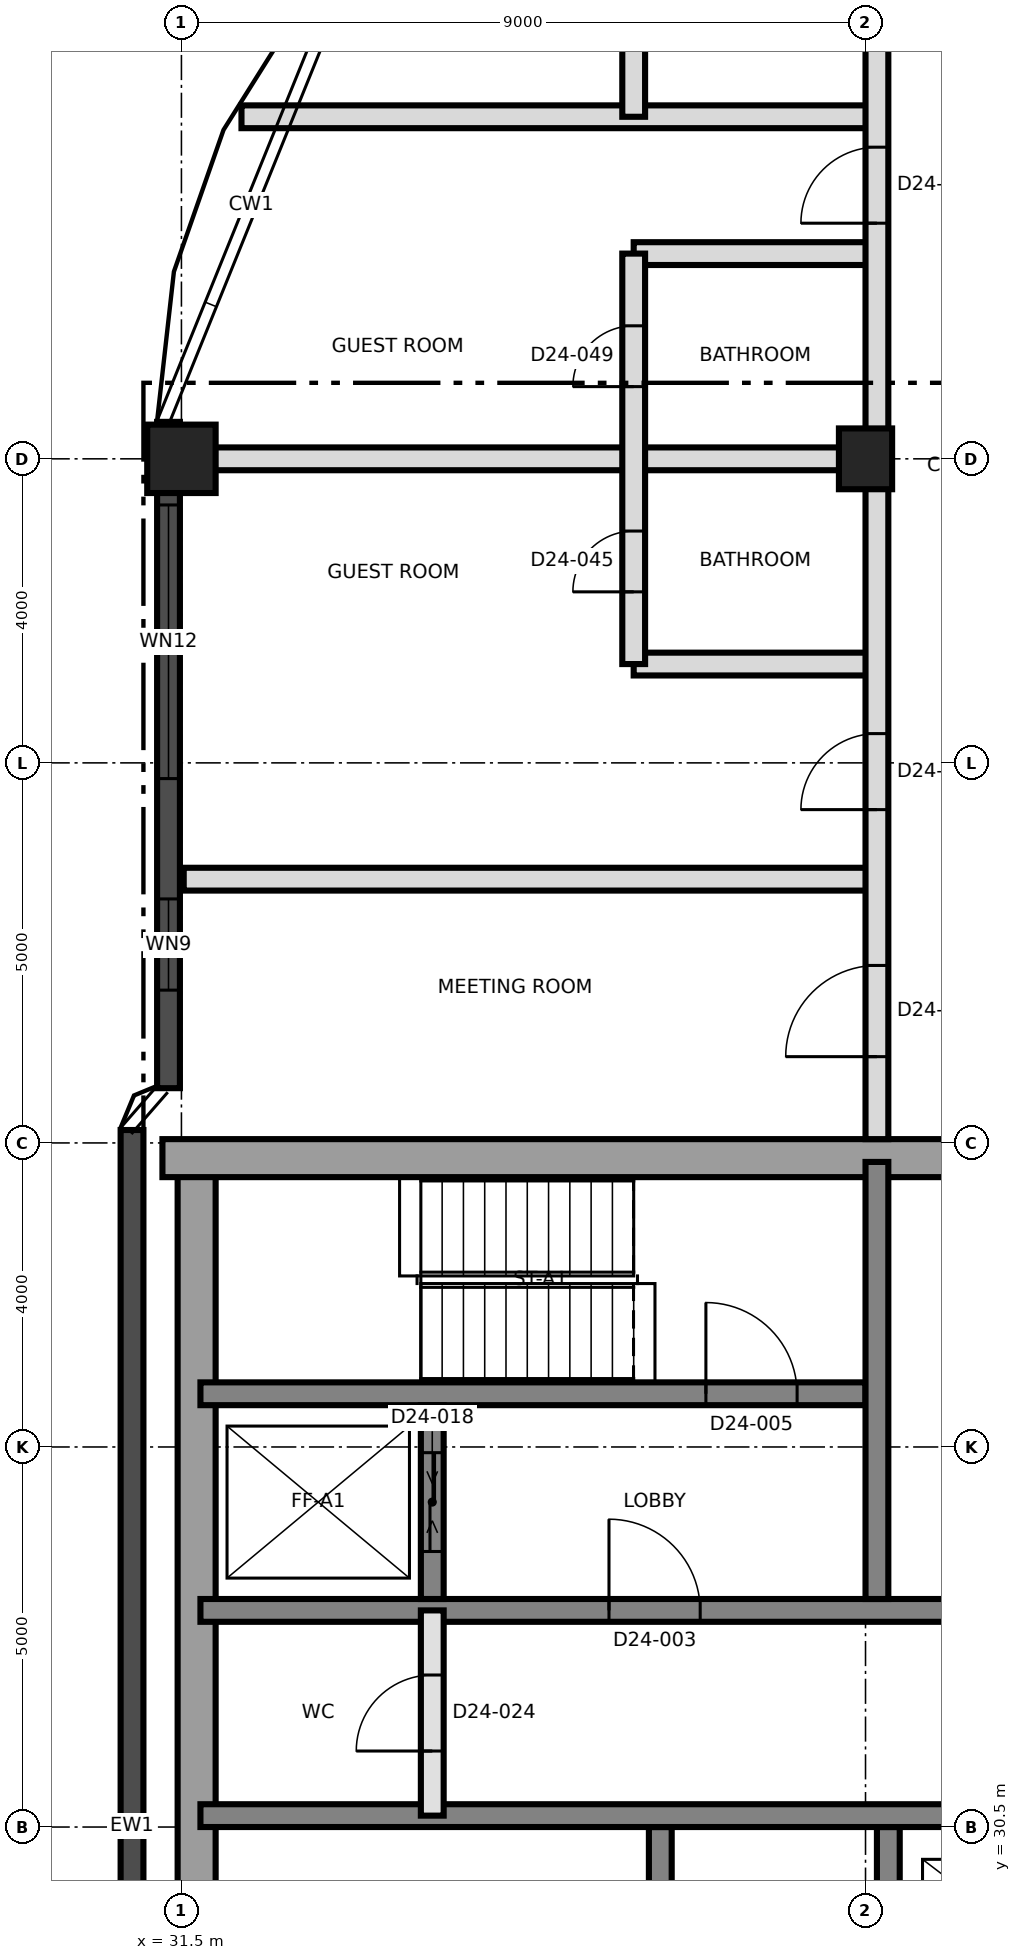
"""IFC4 building model, lengths in metres.
Left out: names, types, materials, properties, quantities, classifications, styles, units other than length and angle.
Written with IfcOpenShell. Run it as: python <this file> out.ifc"""

import sys

from ifc_helpers import new_model, si_unit, direction, frame, frame_2d, origin, origin_2d, place, context, subcontext, project, spatial, rectangle, extrude, element, fill, save


model = new_model("IFC4")
c1 = context("Model", 3, precision=1e-05, world=origin(), true_north=direction((0.0, 1.0)))
c2 = subcontext(c1, "Body", "Model", "MODEL_VIEW")
j1 = project(units=[si_unit("LENGTHUNIT", "METRE"), si_unit("PLANEANGLEUNIT", "RADIAN")], contexts=[c1])
p1 = place(None, origin())
s1 = spatial("IfcSite", under=j1, at=p1, CompositionType="ELEMENT")
p2 = place(p1, origin())
s2 = spatial("IfcBuilding", under=s1, at=p2, CompositionType="ELEMENT")
p3 = place(p2, frame((0.0, 0.0, 218.0)))
s3 = spatial("IfcBuildingStorey", under=s2, at=p3, CompositionType="ELEMENT", Elevation=218.0)
p4 = place(p3, frame((31.7, 21.75, 0.0), z_axis=(0.0, 0.0, 1.0), x_axis=(0.0, 1.0, 0.0)))
e1 = element("IfcWall", 1, at=p4, inside=s3, PredefinedType="SHEAR", context=c2, shape_type="SweptSolid", body=[
    extrude(rectangle(XDim=17.5, YDim=0.5, at=frame_2d((8.75, 0.0))), origin(), (0.0, 0.0, 1.0), 3.7),
])
p5 = place(p3, frame((31.25, 39.3, 0.0), z_axis=(0.0, 0.0, 1.0), x_axis=(1.0, 0.0, 0.0)))
e2 = element("IfcWall", 2, at=p5, inside=s3, PredefinedType="SHEAR", context=c2, shape_type="SweptSolid", body=[
    extrude(rectangle(XDim=27.0, YDim=0.5, at=frame_2d((13.5, 0.0))), origin(), (0.0, 0.0, 1.0), 3.7),
])
p6 = place(p5, frame((10.45, 0.0, 0.0)))
e3 = element("IfcOpeningElement", 3, at=p6, cuts=e2, PredefinedType="OPENING", context=c2, shape_type="SweptSolid", body=[
    extrude(rectangle(XDim=1.2, YDim=2.1, at=frame_2d((0.6, 1.05))), frame((0.0, 0.26, 0.0), z_axis=(0.0, -1.0, 0.0), x_axis=(1.0, 0.0, 0.0)), (0.0, 0.0, 1.0), 0.52),
])
p7 = place(p3, frame((37.8, 21.75, 0.0), z_axis=(0.0, 0.0, 1.0), x_axis=(0.0, 1.0, 0.0)))
e4 = element("IfcWall", 4, at=p7, inside=s3, PredefinedType="SHEAR", context=c2, shape_type="SweptSolid", body=[
    extrude(rectangle(XDim=8.75, YDim=0.3, at=frame_2d((4.375, 0.0))), origin(), (0.0, 0.0, 1.0), 3.7),
])
p8 = place(p7, frame((5.525, 0.0, 0.0)))
e5 = element("IfcOpeningElement", 5, at=p8, cuts=e4, PredefinedType="OPENING", context=c2, shape_type="SweptSolid", body=[
    extrude(rectangle(XDim=1.0, YDim=2.1, at=frame_2d((0.5, 1.05))), frame((0.0, 0.16, 0.0), z_axis=(0.0, -1.0, 0.0), x_axis=(1.0, 0.0, 0.0)), (0.0, 0.0, 1.0), 0.32),
])
p9 = place(p3, frame((40.8, 21.75, 0.0), z_axis=(0.0, 0.0, 1.0), x_axis=(0.0, 1.0, 0.0)))
e6 = element("IfcWall", 6, at=p9, inside=s3, PredefinedType="SHEAR", context=c2, shape_type="SweptSolid", body=[
    extrude(rectangle(XDim=8.75, YDim=0.3, at=frame_2d((4.375, 0.0))), origin(), (0.0, 0.0, 1.0), 3.7),
])
p10 = place(p9, frame((3.9, 0.0, 0.0)))
e7 = element("IfcOpeningElement", 7, at=p10, cuts=e6, PredefinedType="OPENING", context=c2, shape_type="SweptSolid", body=[
    extrude(rectangle(XDim=1.5, YDim=2.1, at=frame_2d((0.75, 1.05))), frame((0.0, 0.16, 0.0), z_axis=(0.0, -1.0, 0.0), x_axis=(1.0, 0.0, 0.0)), (0.0, 0.0, 1.0), 0.32),
])
p11 = place(p3, frame((31.75, 30.65, 0.0), z_axis=(0.0, 0.0, 1.0), x_axis=(1.0, 0.0, 0.0)))
e8 = element("IfcWall", 8, at=p11, inside=s3, PredefinedType="SHEAR", context=c2, shape_type="SweptSolid", body=[
    extrude(rectangle(XDim=26.5, YDim=0.3, at=frame_2d((13.25, 0.0))), origin(), (0.0, 0.0, 1.0), 3.7),
])
p12 = place(p11, frame((24.75, 0.0, 0.0)))
e9 = element("IfcOpeningElement", 9, at=p12, cuts=e8, PredefinedType="OPENING", context=c2, shape_type="SweptSolid", body=[
    extrude(rectangle(XDim=1.0, YDim=2.1, at=frame_2d((0.5, 1.05))), frame((0.0, 0.16, 0.0), z_axis=(0.0, -1.0, 0.0), x_axis=(1.0, 0.0, 0.0)), (0.0, 0.0, 1.0), 0.32),
])
p13 = place(p3, frame((31.75, 33.35, 0.0), z_axis=(0.0, 0.0, 1.0), x_axis=(1.0, 0.0, 0.0)))
e10 = element("IfcWall", 10, at=p13, inside=s3, PredefinedType="SHEAR", context=c2, shape_type="SweptSolid", body=[
    extrude(rectangle(XDim=26.5, YDim=0.3, at=frame_2d((13.25, 0.0))), origin(), (0.0, 0.0, 1.0), 3.7),
])
p14 = place(p13, frame((13.9, 0.0, 0.0)))
e11 = element("IfcOpeningElement", 11, at=p14, cuts=e10, PredefinedType="OPENING", context=c2, shape_type="SweptSolid", body=[
    extrude(rectangle(XDim=1.4, YDim=2.1, at=frame_2d((0.7, 1.05))), frame((0.0, 0.16, 0.0), z_axis=(0.0, -1.0, 0.0), x_axis=(1.0, 0.0, 0.0)), (0.0, 0.0, 1.0), 0.32),
])
p15 = place(p13, frame((5.375, 0.0, 0.0)))
e12 = element("IfcOpeningElement", 12, at=p15, cuts=e10, PredefinedType="OPENING", context=c2, shape_type="SweptSolid", body=[
    extrude(rectangle(XDim=1.2, YDim=2.1, at=frame_2d((0.6, 1.05))), frame((0.0, 0.16, 0.0), z_axis=(0.0, -1.0, 0.0), x_axis=(1.0, 0.0, 0.0)), (0.0, 0.0, 1.0), 0.32),
])
p16 = place(p13, frame((19.925, 0.0, 0.0)))
e13 = element("IfcOpeningElement", 13, at=p16, cuts=e10, PredefinedType="OPENING", context=c2, shape_type="SweptSolid", body=[
    extrude(rectangle(XDim=1.2, YDim=2.1, at=frame_2d((0.6, 1.05))), frame((0.0, 0.16, 0.0), z_axis=(0.0, -1.0, 0.0), x_axis=(1.0, 0.0, 0.0)), (0.0, 0.0, 1.0), 0.32),
])
p17 = place(p3, frame((31.75, 36.2, 0.0), z_axis=(0.0, 0.0, 1.0), x_axis=(1.0, 0.0, 0.0)))
e14 = element("IfcWall", 14, at=p17, inside=s3, PredefinedType="SHEAR", context=c2, shape_type="SweptSolid", body=[
    extrude(rectangle(XDim=8.75, YDim=0.3, at=frame_2d((4.375, 0.0))), origin(), (0.0, 0.0, 1.0), 3.7),
])
p18 = place(p17, frame((6.65, 0.0, 0.0)))
e15 = element("IfcOpeningElement", 15, at=p18, cuts=e14, PredefinedType="OPENING", context=c2, shape_type="SweptSolid", body=[
    extrude(rectangle(XDim=1.2, YDim=2.1, at=frame_2d((0.6, 1.05))), frame((0.0, 0.16, 0.0), z_axis=(0.0, -1.0, 0.0), x_axis=(1.0, 0.0, 0.0)), (0.0, 0.0, 1.0), 0.32),
])
p19 = place(p3, frame((40.65, 33.5, 0.0), z_axis=(0.0, 0.0, 1.0), x_axis=(0.0, 1.0, 0.0)))
e16 = element("IfcWall", 16, at=p19, inside=s3, PredefinedType="SHEAR", context=c2, shape_type="SweptSolid", body=[
    extrude(rectangle(XDim=5.75, YDim=0.3, at=frame_2d((2.875, 0.0))), origin(), (0.0, 0.0, 1.0), 3.7),
])
p20 = place(p3, frame((34.8, 33.5, 0.0), z_axis=(0.0, 0.0, 1.0), x_axis=(0.0, 1.0, 0.0)))
e17 = element("IfcWall", 17, at=p20, inside=s3, PredefinedType="SHEAR", context=c2, shape_type="SweptSolid", body=[
    extrude(rectangle(XDim=2.55, YDim=0.3, at=frame_2d((1.275, 0.0))), origin(), (0.0, 0.0, 1.0), 3.7),
])
p21 = place(p20, frame((0.625, 0.0, 0.0)))
e18 = element("IfcOpeningElement", 18, at=p21, cuts=e17, PredefinedType="OPENING", context=c2, shape_type="SweptSolid", body=[
    extrude(rectangle(XDim=1.3, YDim=2.4, at=frame_2d((0.65, 1.2))), frame((0.0, 0.16, 0.0), z_axis=(0.0, -1.0, 0.0), x_axis=(1.0, 0.0, 0.0)), (0.0, 0.0, 1.0), 0.32),
])
p22 = place(p3, frame((31.5, 48.5, 0.0), z_axis=(0.0, 0.0, 1.0), x_axis=(1.0, 0.0, 0.0)))
e19 = element("IfcColumn", 19, at=p22, inside=s3, PredefinedType="COLUMN", context=c2, shape_type="SweptSolid", body=[
    extrude(rectangle(XDim=0.9, YDim=0.9, at=origin_2d()), origin(), (0.0, 0.0, 1.0), 3.7),
])
p23 = place(p3, frame((40.5, 48.5, 0.0), z_axis=(0.0, 0.0, 1.0), x_axis=(0.0, 1.0, 0.0)))
e20 = element("IfcColumn", 20, at=p23, inside=s3, PredefinedType="COLUMN", context=c2, shape_type="SweptSolid", body=[
    extrude(rectangle(XDim=0.8, YDim=0.7, at=origin_2d()), origin(), (0.0, 0.0, 1.0), 3.7),
])
p24 = place(p3, frame((31.33, 48.986, 0.0), z_axis=(0.0, 0.0, 1.0), x_axis=(0.0, -1.0, 0.0)))
e21 = element("IfcWall", 21, at=p24, inside=s3, PredefinedType="SOLIDWALL", context=c2, shape_type="SweptSolid", body=[
    extrude(rectangle(XDim=8.766, YDim=0.3, at=frame_2d((4.383, 0.0))), origin(), (0.0, 0.0, 1.0), 3.4),
])
p25 = place(p24, frame((1.093, 0.0, 0.9)))
e22 = element("IfcOpeningElement", 22, at=p25, cuts=e21, PredefinedType="OPENING", context=c2, shape_type="SweptSolid", body=[
    extrude(rectangle(XDim=3.6, YDim=1.5, at=frame_2d((1.8, 0.75))), frame((0.0, 0.16, 0.0), z_axis=(0.0, -1.0, 0.0), x_axis=(1.0, 0.0, 0.0)), (0.0, 0.0, 1.0), 0.32),
])
p26 = place(p24, frame((6.276, 0.0, 0.9)))
e23 = element("IfcOpeningElement", 23, at=p26, cuts=e21, PredefinedType="OPENING", context=c2, shape_type="SweptSolid", body=[
    extrude(rectangle(XDim=1.2, YDim=1.5, at=frame_2d((0.6, 0.75))), frame((0.0, 0.16, 0.0), z_axis=(0.0, -1.0, 0.0), x_axis=(1.0, 0.0, 0.0)), (0.0, 0.0, 1.0), 0.32),
])
p27 = place(p3, frame((30.85, 39.67, 0.0), z_axis=(0.0, 0.0, 1.0), x_axis=(0.0, -1.0, 0.0)))
e24 = element("IfcWall", 24, at=p27, inside=s3, PredefinedType="SOLIDWALL", context=c2, shape_type="SweptSolid", body=[
    extrude(rectangle(XDim=18.31, YDim=0.3, at=frame_2d((9.155, 0.0))), origin(), (0.0, 0.0, 1.0), 3.4),
])
p28 = place(p3, frame((34.8, 30.65, 0.0), z_axis=(0.0, 0.0, 1.0), x_axis=(0.0, 1.0, 0.0)))
e25 = element("IfcWall", 25, at=p28, inside=s3, PredefinedType="SOLIDWALL", context=c2, shape_type="SweptSolid", body=[
    extrude(rectangle(XDim=2.7, YDim=0.3, at=frame_2d((1.35, 0.0))), origin(), (0.0, 0.0, 1.0), 3.4),
])
p29 = place(p28, frame((0.85, 0.0, 0.0)))
e26 = element("IfcOpeningElement", 26, at=p29, cuts=e25, PredefinedType="OPENING", context=c2, shape_type="SweptSolid", body=[
    extrude(rectangle(XDim=1.0, YDim=2.1, at=frame_2d((0.5, 1.05))), frame((0.0, 0.16, 0.0), z_axis=(0.0, -1.0, 0.0), x_axis=(1.0, 0.0, 0.0)), (0.0, 0.0, 1.0), 0.32),
])
p30 = place(p3, frame((31.53, 42.97, 0.0), z_axis=(0.0, 0.0, 1.0), x_axis=(1.0, 0.0, 0.0)))
e27 = element("IfcWall", 27, at=p30, inside=s3, PredefinedType="PARTITIONING", context=c2, shape_type="SweptSolid", body=[
    extrude(rectangle(XDim=9.12, YDim=0.3, at=frame_2d((4.56, 0.0))), origin(), (0.0, 0.0, 1.0), 3.4),
])
p31 = place(p3, frame((37.45, 45.8, 0.0), z_axis=(0.0, 0.0, 1.0), x_axis=(1.0, 0.0, 0.0)))
e28 = element("IfcWall", 28, at=p31, inside=s3, PredefinedType="PARTITIONING", context=c2, shape_type="SweptSolid", body=[
    extrude(rectangle(XDim=3.2, YDim=0.3, at=frame_2d((1.6, 0.0))), origin(), (0.0, 0.0, 1.0), 3.4),
])
p32 = place(p3, frame((31.53, 48.5, 0.0), z_axis=(0.0, 0.0, 1.0), x_axis=(1.0, 0.0, 0.0)))
e29 = element("IfcWall", 29, at=p32, inside=s3, PredefinedType="PARTITIONING", context=c2, shape_type="SweptSolid", body=[
    extrude(rectangle(XDim=9.12, YDim=0.3, at=frame_2d((4.56, 0.0))), origin(), (0.0, 0.0, 1.0), 3.4),
])
p33 = place(p3, frame((37.45, 51.2, 0.0), z_axis=(0.0, 0.0, 1.0), x_axis=(1.0, 0.0, 0.0)))
e30 = element("IfcWall", 30, at=p33, inside=s3, PredefinedType="PARTITIONING", context=c2, shape_type="SweptSolid", body=[
    extrude(rectangle(XDim=3.2, YDim=0.3, at=frame_2d((1.6, 0.0))), origin(), (0.0, 0.0, 1.0), 3.4),
])
p34 = place(p3, frame((32.29, 53.0, 0.0), z_axis=(0.0, 0.0, 1.0), x_axis=(1.0, 0.0, 0.0)))
e31 = element("IfcWall", 31, at=p34, inside=s3, PredefinedType="PARTITIONING", context=c2, shape_type="SweptSolid", body=[
    extrude(rectangle(XDim=8.36, YDim=0.3, at=frame_2d((4.18, 0.0))), origin(), (0.0, 0.0, 1.0), 3.4),
])
p35 = place(p3, frame((37.45, 45.8, 0.0), z_axis=(0.0, 0.0, 1.0), x_axis=(0.0, 1.0, 0.0)))
e32 = element("IfcWall", 32, at=p35, inside=s3, PredefinedType="PARTITIONING", context=c2, shape_type="SweptSolid", body=[
    extrude(rectangle(XDim=5.4, YDim=0.3, at=frame_2d((2.7, 0.0))), origin(), (0.0, 0.0, 1.0), 3.4),
])
p36 = place(p35, frame((0.95, 0.0, 0.0)))
e33 = element("IfcOpeningElement", 33, at=p36, cuts=e32, PredefinedType="OPENING", context=c2, shape_type="SweptSolid", body=[
    extrude(rectangle(XDim=0.8, YDim=2.1, at=frame_2d((0.4, 1.05))), frame((0.0, 0.16, 0.0), z_axis=(0.0, -1.0, 0.0), x_axis=(1.0, 0.0, 0.0)), (0.0, 0.0, 1.0), 0.32),
])
p37 = place(p35, frame((3.65, 0.0, 0.0)))
e34 = element("IfcOpeningElement", 34, at=p37, cuts=e32, PredefinedType="OPENING", context=c2, shape_type="SweptSolid", body=[
    extrude(rectangle(XDim=0.8, YDim=2.1, at=frame_2d((0.4, 1.05))), frame((0.0, 0.16, 0.0), z_axis=(0.0, -1.0, 0.0), x_axis=(1.0, 0.0, 0.0)), (0.0, 0.0, 1.0), 0.32),
])
p38 = place(p3, frame((37.45, 53.0, 0.0), z_axis=(0.0, 0.0, 1.0), x_axis=(0.0, 1.0, 0.0)))
e35 = element("IfcWall", 35, at=p38, inside=s3, PredefinedType="PARTITIONING", context=c2, shape_type="SweptSolid", body=[
    extrude(rectangle(XDim=2.7, YDim=0.3, at=frame_2d((1.35, 0.0))), origin(), (0.0, 0.0, 1.0), 3.4),
])
p39 = place(p38, frame((0.95, 0.0, 0.0)))
e36 = element("IfcOpeningElement", 36, at=p39, cuts=e35, PredefinedType="OPENING", context=c2, shape_type="SweptSolid", body=[
    extrude(rectangle(XDim=0.8, YDim=2.1, at=frame_2d((0.4, 1.05))), frame((0.0, 0.16, 0.0), z_axis=(0.0, -1.0, 0.0), x_axis=(1.0, 0.0, 0.0)), (0.0, 0.0, 1.0), 0.32),
])
p40 = place(p3, frame((40.65, 39.55, 0.0), z_axis=(0.0, 0.0, 1.0), x_axis=(0.0, 1.0, 0.0)))
e37 = element("IfcWall", 37, at=p40, inside=s3, PredefinedType="PARTITIONING", context=c2, shape_type="SweptSolid", body=[
    extrude(rectangle(XDim=17.92, YDim=0.3, at=frame_2d((8.96, 0.0))), origin(), (0.0, 0.0, 1.0), 3.4),
])
p41 = place(p40, frame((1.085, 0.0, 0.0)))
e38 = element("IfcOpeningElement", 38, at=p41, cuts=e37, PredefinedType="OPENING", context=c2, shape_type="SweptSolid", body=[
    extrude(rectangle(XDim=1.2, YDim=2.1, at=frame_2d((0.6, 1.05))), frame((0.0, 0.16, 0.0), z_axis=(0.0, -1.0, 0.0), x_axis=(1.0, 0.0, 0.0)), (0.0, 0.0, 1.0), 0.32),
])
p42 = place(p40, frame((4.335, 0.0, 0.0)))
e39 = element("IfcOpeningElement", 39, at=p42, cuts=e37, PredefinedType="OPENING", context=c2, shape_type="SweptSolid", body=[
    extrude(rectangle(XDim=1.0, YDim=2.1, at=frame_2d((0.5, 1.05))), frame((0.0, 0.16, 0.0), z_axis=(0.0, -1.0, 0.0), x_axis=(1.0, 0.0, 0.0)), (0.0, 0.0, 1.0), 0.32),
])
p43 = place(p40, frame((12.05, 0.0, 0.0)))
e40 = element("IfcOpeningElement", 40, at=p43, cuts=e37, PredefinedType="OPENING", context=c2, shape_type="SweptSolid", body=[
    extrude(rectangle(XDim=1.0, YDim=2.1, at=frame_2d((0.5, 1.05))), frame((0.0, 0.16, 0.0), z_axis=(0.0, -1.0, 0.0), x_axis=(1.0, 0.0, 0.0)), (0.0, 0.0, 1.0), 0.32),
])
p44 = place(p40, frame((16.45, 0.0, 0.0)))
e41 = element("IfcOpeningElement", 41, at=p44, cuts=e37, PredefinedType="OPENING", context=c2, shape_type="SweptSolid", body=[
    extrude(rectangle(XDim=1.0, YDim=2.1, at=frame_2d((0.5, 1.05))), frame((0.0, 0.16, 0.0), z_axis=(0.0, -1.0, 0.0), x_axis=(1.0, 0.0, 0.0)), (0.0, 0.0, 1.0), 0.32),
])
p45 = place(p25, origin())
e42 = element("IfcWindow", 42, at=p45, inside=s3, PartitioningType="SINGLE_PANEL", PredefinedType="WINDOW", context=c2, shape_type="SweptSolid", body=[
    extrude(rectangle(XDim=3.6, YDim=1.5, at=frame_2d((1.8, 0.75))), frame((0.0, 0.03, 0.0), z_axis=(0.0, -1.0, 0.0), x_axis=(1.0, 0.0, 0.0)), (0.0, 0.0, 1.0), 0.06),
])
fill(e22, e42)
p46 = place(p26, origin())
e43 = element("IfcWindow", 43, at=p46, inside=s3, PartitioningType="SINGLE_PANEL", PredefinedType="WINDOW", context=c2, shape_type="SweptSolid", body=[
    extrude(rectangle(XDim=1.2, YDim=1.5, at=frame_2d((0.6, 0.75))), frame((0.0, 0.03, 0.0), z_axis=(0.0, -1.0, 0.0), x_axis=(1.0, 0.0, 0.0)), (0.0, 0.0, 1.0), 0.06),
])
fill(e23, e43)
p47 = place(p15, origin())
e44 = element("IfcDoor", 44, at=p47, inside=s3, OperationType="SINGLE_SWING_LEFT", PredefinedType="DOOR", context=c2, shape_type="SweptSolid", body=[
    extrude(rectangle(XDim=1.2, YDim=2.1, at=frame_2d((0.6, 1.05))), frame((0.0, 0.025, 0.0), z_axis=(0.0, -1.0, 0.0), x_axis=(1.0, 0.0, 0.0)), (0.0, 0.0, 1.0), 0.05),
])
fill(e12, e44)
p48 = place(p18, origin())
e45 = element("IfcDoor", 45, at=p48, inside=s3, OperationType="SINGLE_SWING_RIGHT", PredefinedType="DOOR", context=c2, shape_type="SweptSolid", body=[
    extrude(rectangle(XDim=1.2, YDim=2.1, at=frame_2d((0.6, 1.05))), frame((0.0, 0.025, 0.0), z_axis=(0.0, -1.0, 0.0), x_axis=(1.0, 0.0, 0.0)), (0.0, 0.0, 1.0), 0.05),
])
fill(e15, e45)
p49 = place(p21, origin())
e46 = element("IfcDoor", 46, at=p49, inside=s3, OperationType="SLIDING_TO_LEFT", PredefinedType="DOOR", context=c2, shape_type="SweptSolid", body=[
    extrude(rectangle(XDim=1.3, YDim=2.4, at=frame_2d((0.65, 1.2))), frame((0.0, 0.025, 0.0), z_axis=(0.0, -1.0, 0.0), x_axis=(1.0, 0.0, 0.0)), (0.0, 0.0, 1.0), 0.05),
])
fill(e18, e46)
p50 = place(p29, origin())
e47 = element("IfcDoor", 47, at=p50, inside=s3, OperationType="SINGLE_SWING_LEFT", PredefinedType="DOOR", context=c2, shape_type="SweptSolid", body=[
    extrude(rectangle(XDim=1.0, YDim=2.1, at=frame_2d((0.5, 1.05))), frame((0.0, 0.025, 0.0), z_axis=(0.0, -1.0, 0.0), x_axis=(1.0, 0.0, 0.0)), (0.0, 0.0, 1.0), 0.05),
])
fill(e26, e47)
p51 = place(p41, origin())
e48 = element("IfcDoor", 48, at=p51, inside=s3, OperationType="SINGLE_SWING_LEFT", PredefinedType="DOOR", context=c2, shape_type="SweptSolid", body=[
    extrude(rectangle(XDim=1.2, YDim=2.1, at=frame_2d((0.6, 1.05))), frame((0.0, 0.025, 0.0), z_axis=(0.0, -1.0, 0.0), x_axis=(1.0, 0.0, 0.0)), (0.0, 0.0, 1.0), 0.05),
])
fill(e38, e48)
p52 = place(p36, origin())
e49 = element("IfcDoor", 49, at=p52, inside=s3, OperationType="SINGLE_SWING_LEFT", PredefinedType="DOOR", context=c2, shape_type="SweptSolid", body=[
    extrude(rectangle(XDim=0.8, YDim=2.1, at=frame_2d((0.4, 1.05))), frame((0.0, 0.025, 0.0), z_axis=(0.0, -1.0, 0.0), x_axis=(1.0, 0.0, 0.0)), (0.0, 0.0, 1.0), 0.05),
])
fill(e33, e49)
p53 = place(p42, origin())
e50 = element("IfcDoor", 50, at=p53, inside=s3, OperationType="SINGLE_SWING_RIGHT", PredefinedType="DOOR", context=c2, shape_type="SweptSolid", body=[
    extrude(rectangle(XDim=1.0, YDim=2.1, at=frame_2d((0.5, 1.05))), frame((0.0, 0.025, 0.0), z_axis=(0.0, -1.0, 0.0), x_axis=(1.0, 0.0, 0.0)), (0.0, 0.0, 1.0), 0.05),
])
fill(e39, e50)
p54 = place(p37, origin())
e51 = element("IfcDoor", 51, at=p54, inside=s3, OperationType="SINGLE_SWING_LEFT", PredefinedType="DOOR", context=c2, shape_type="SweptSolid", body=[
    extrude(rectangle(XDim=0.8, YDim=2.1, at=frame_2d((0.4, 1.05))), frame((0.0, 0.025, 0.0), z_axis=(0.0, -1.0, 0.0), x_axis=(1.0, 0.0, 0.0)), (0.0, 0.0, 1.0), 0.05),
])
fill(e34, e51)
p55 = place(p43, origin())
e52 = element("IfcDoor", 52, at=p55, inside=s3, OperationType="SINGLE_SWING_LEFT", PredefinedType="DOOR", context=c2, shape_type="SweptSolid", body=[
    extrude(rectangle(XDim=1.0, YDim=2.1, at=frame_2d((0.5, 1.05))), frame((0.0, 0.025, 0.0), z_axis=(0.0, -1.0, 0.0), x_axis=(1.0, 0.0, 0.0)), (0.0, 0.0, 1.0), 0.05),
])
fill(e40, e52)
save(model, sys.argv[1])
